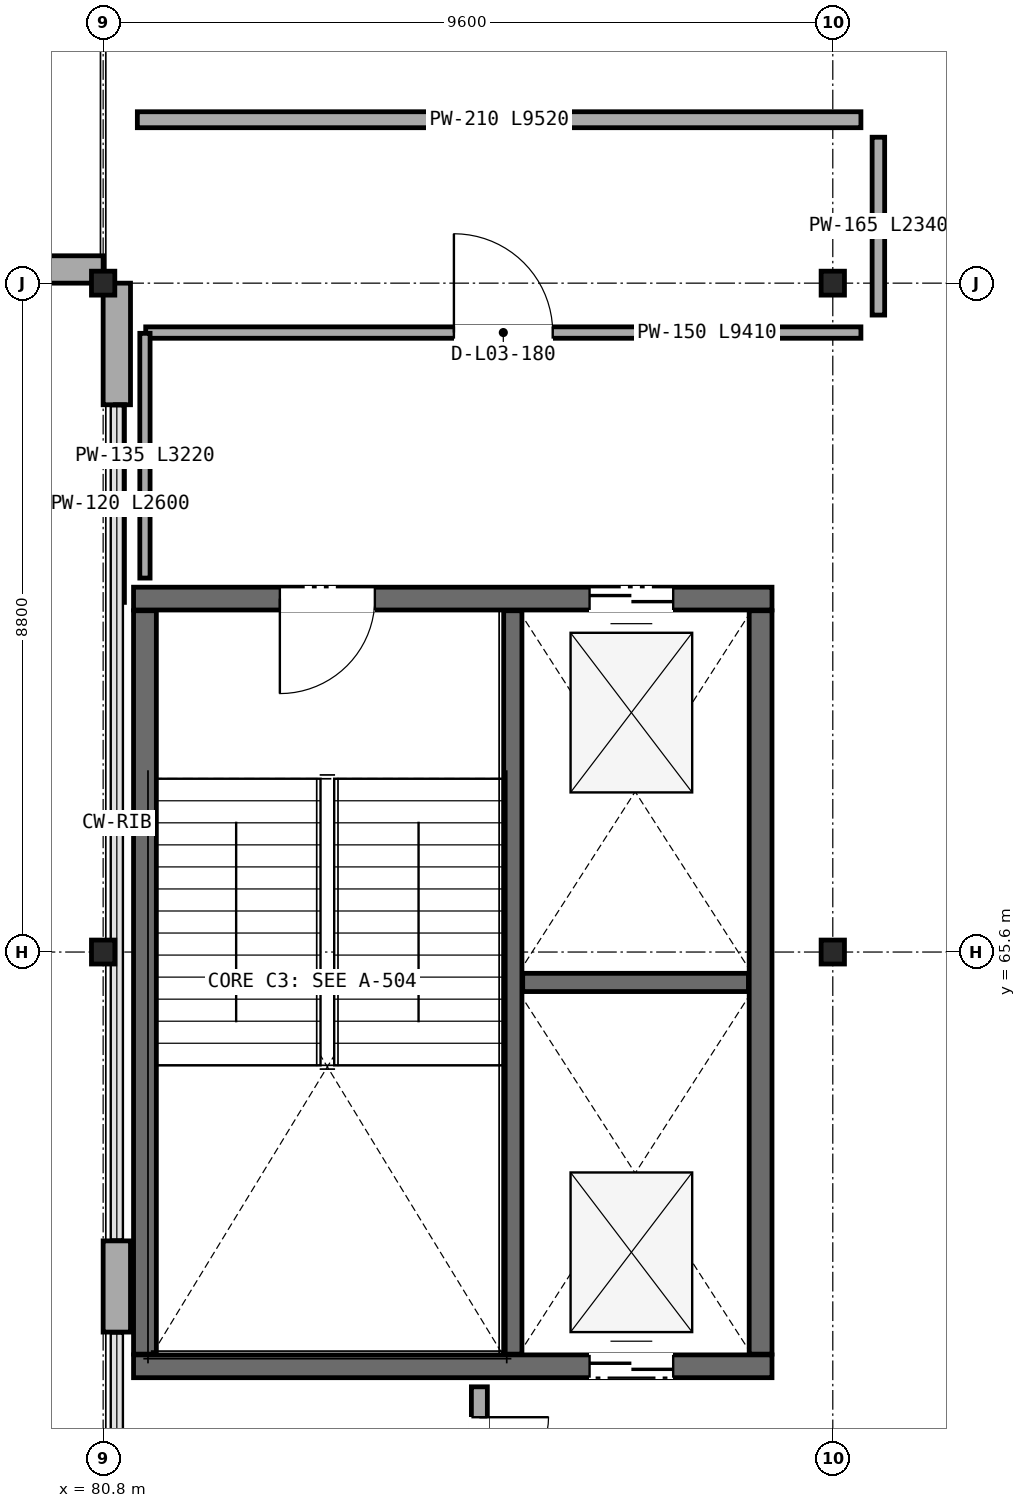
"""IFC4 building model, lengths in metres.
Left out: names, types, materials, properties, quantities, classifications, styles, units other than length and angle.
Written with IfcOpenShell. Run it as: python <this file> out.ifc"""

import sys

from ifc_helpers import new_model, si_unit, direction, frame, frame_2d, origin, origin_2d, place, context, subcontext, project, spatial, rectangle, i_section, extrude, element, fill, save


model = new_model("IFC4")
c1 = context("Model", 3, precision=1e-05, world=origin(), true_north=direction((0.0, 1.0)))
c2 = subcontext(c1, "Body", "Model", "MODEL_VIEW")
j1 = project(units=[si_unit("LENGTHUNIT", "METRE"), si_unit("PLANEANGLEUNIT", "RADIAN")], contexts=[c1])
p1 = place(None, origin())
s1 = spatial("IfcSite", under=j1, at=p1, CompositionType="ELEMENT")
p2 = place(p1, origin())
s2 = spatial("IfcBuilding", under=s1, at=p2, CompositionType="ELEMENT")
p3 = place(p2, frame((0.0, 0.0, 14.6)))
s3 = spatial("IfcBuildingStorey", under=s2, at=p3, CompositionType="ELEMENT", Elevation=14.6)
for number, where, z_axis, x_axis in (
    (1, (90.4, 65.6, 0.0), (0.0, 0.0, 1.0), (1.0, 0.0, 0.0)),
    (2, (90.4, 74.4, 0.0), (0.0, 0.0, 1.0), (1.0, 0.0, 0.0)),
    (3, (80.8, 65.6, 0.0), (0.0, 0.0, 1.0), (1.0, 0.0, 0.0)),
    (4, (80.8, 74.4, 0.0), (0.0, 0.0, 1.0), (1.0, 0.0, 0.0)),
):
    element("IfcColumn", number, at=place(p3, frame(where, z_axis=z_axis, x_axis=x_axis)), inside=s3, PredefinedType="COLUMN", context=c2, shape_type="SweptSolid", body=[
        extrude(i_section(OverallWidth=0.307, OverallDepth=0.315, WebThickness=0.012, FlangeThickness=0.019, FilletRadius=0.017, at=origin_2d()), origin(), (0.0, 0.0, 1.0), 4.5),
    ])
p4 = place(p3, frame((42.4, 74.58, 0.0), z_axis=(0.0, 0.0, 1.0), x_axis=(1.0, 0.0, 0.0)))
e5 = element("IfcWall", 5, at=p4, inside=s3, PredefinedType="SOLIDWALL", context=c2, shape_type="SweptSolid", body=[
    extrude(rectangle(XDim=38.4, YDim=0.36, at=frame_2d((19.2, 0.0))), origin(), (0.0, 0.0, 1.0), 3.662),
])
p5 = place(p4, frame((1.8, 0.0, 0.9)))
e6 = element("IfcOpeningElement", 6, at=p5, cuts=e5, PredefinedType="OPENING", context=c2, shape_type="SweptSolid", body=[
    extrude(rectangle(XDim=1.25, YDim=1.55, at=frame_2d((0.625, 0.775))), frame((0.0, 0.19, 0.0), z_axis=(0.0, -1.0, 0.0), x_axis=(1.0, 0.0, 0.0)), (0.0, 0.0, 1.0), 0.38),
])
p6 = place(p4, frame((6.4, 0.0, 0.9)))
e7 = element("IfcOpeningElement", 7, at=p6, cuts=e5, PredefinedType="OPENING", context=c2, shape_type="SweptSolid", body=[
    extrude(rectangle(XDim=1.52, YDim=1.55, at=frame_2d((0.76, 0.775))), frame((0.0, 0.19, 0.0), z_axis=(0.0, -1.0, 0.0), x_axis=(1.0, 0.0, 0.0)), (0.0, 0.0, 1.0), 0.38),
])
p7 = place(p4, frame((11.0, 0.0, 0.9)))
e8 = element("IfcOpeningElement", 8, at=p7, cuts=e5, PredefinedType="OPENING", context=c2, shape_type="SweptSolid", body=[
    extrude(rectangle(XDim=1.55, YDim=1.55, at=frame_2d((0.775, 0.775))), frame((0.0, 0.19, 0.0), z_axis=(0.0, -1.0, 0.0), x_axis=(1.0, 0.0, 0.0)), (0.0, 0.0, 1.0), 0.38),
])
p8 = place(p4, frame((15.6, 0.0, 0.9)))
e9 = element("IfcOpeningElement", 9, at=p8, cuts=e5, PredefinedType="OPENING", context=c2, shape_type="SweptSolid", body=[
    extrude(rectangle(XDim=1.82, YDim=1.55, at=frame_2d((0.91, 0.775))), frame((0.0, 0.19, 0.0), z_axis=(0.0, -1.0, 0.0), x_axis=(1.0, 0.0, 0.0)), (0.0, 0.0, 1.0), 0.38),
])
p9 = place(p4, frame((20.2, 0.0, 0.9)))
e10 = element("IfcOpeningElement", 10, at=p9, cuts=e5, PredefinedType="OPENING", context=c2, shape_type="SweptSolid", body=[
    extrude(rectangle(XDim=1.85, YDim=1.55, at=frame_2d((0.925, 0.775))), frame((0.0, 0.19, 0.0), z_axis=(0.0, -1.0, 0.0), x_axis=(1.0, 0.0, 0.0)), (0.0, 0.0, 1.0), 0.38),
])
p10 = place(p4, frame((24.8, 0.0, 0.9)))
e11 = element("IfcOpeningElement", 11, at=p10, cuts=e5, PredefinedType="OPENING", context=c2, shape_type="SweptSolid", body=[
    extrude(rectangle(XDim=2.0, YDim=1.55, at=frame_2d((1.0, 0.775))), frame((0.0, 0.19, 0.0), z_axis=(0.0, -1.0, 0.0), x_axis=(1.0, 0.0, 0.0)), (0.0, 0.0, 1.0), 0.38),
])
p11 = place(p3, frame((80.98, 74.4, 0.0), z_axis=(0.0, 0.0, 1.0), x_axis=(0.0, -1.0, 0.0)))
e12 = element("IfcWall", 12, at=p11, inside=s3, PredefinedType="SOLIDWALL", context=c2, shape_type="SweptSolid", body=[
    extrude(rectangle(XDim=1.6, YDim=0.36, at=frame_2d((0.8, 0.0))), origin(), (0.0, 0.0, 1.0), 3.702),
])
p12 = place(p3, frame((80.98, 61.8, 0.0), z_axis=(0.0, 0.0, 1.0), x_axis=(0.0, -1.0, 0.0)))
e13 = element("IfcWall", 13, at=p12, inside=s3, PredefinedType="SOLIDWALL", context=c2, shape_type="SweptSolid", body=[
    extrude(rectangle(XDim=1.2, YDim=0.36, at=frame_2d((0.6, 0.0))), origin(), (0.0, 0.0, 1.0), 3.778),
])
p13 = place(p3, frame((81.2, 60.15, 0.0), z_axis=(0.0, 0.0, 1.0), x_axis=(1.0, 0.0, 0.0)))
e14 = element("IfcWall", 14, at=p13, inside=s3, PredefinedType="SHEAR", context=c2, shape_type="SweptSolid", body=[
    extrude(rectangle(XDim=8.4, YDim=0.3, at=frame_2d((4.2, 0.0))), origin(), (0.0, 0.0, 1.0), 4.245),
])
p14 = place(p13, frame((6.0, 0.0, 0.0)))
e15 = element("IfcOpeningElement", 15, at=p14, cuts=e14, PredefinedType="OPENING", context=c2, shape_type="SweptSolid", body=[
    extrude(rectangle(XDim=1.1, YDim=2.2, at=frame_2d((0.55, 1.1))), frame((0.0, 0.16, 0.0), z_axis=(0.0, -1.0, 0.0), x_axis=(1.0, 0.0, 0.0)), (0.0, 0.0, 1.0), 0.32),
])
p15 = place(p3, frame((89.6, 70.25, 0.0), z_axis=(0.0, 0.0, 1.0), x_axis=(-1.0, 0.0, 0.0)))
e16 = element("IfcWall", 16, at=p15, inside=s3, PredefinedType="SHEAR", context=c2, shape_type="SweptSolid", body=[
    extrude(rectangle(XDim=8.4, YDim=0.3, at=frame_2d((4.2, 0.0))), origin(), (0.0, 0.0, 1.0), 4.245),
])
p16 = place(p15, frame((5.225, 0.0, 0.0)))
e17 = element("IfcOpeningElement", 17, at=p16, cuts=e16, PredefinedType="OPENING", context=c2, shape_type="SweptSolid", body=[
    extrude(rectangle(XDim=1.25, YDim=2.2, at=frame_2d((0.625, 1.1))), frame((0.0, 0.16, 0.0), z_axis=(0.0, -1.0, 0.0), x_axis=(1.0, 0.0, 0.0)), (0.0, 0.0, 1.0), 0.32),
])
p17 = place(p15, frame((1.3, 0.0, 0.0)))
e18 = element("IfcOpeningElement", 18, at=p17, cuts=e16, PredefinedType="OPENING", context=c2, shape_type="SweptSolid", body=[
    extrude(rectangle(XDim=1.1, YDim=2.2, at=frame_2d((0.55, 1.1))), frame((0.0, 0.16, 0.0), z_axis=(0.0, -1.0, 0.0), x_axis=(1.0, 0.0, 0.0)), (0.0, 0.0, 1.0), 0.32),
])
for number, where, z_axis, x_axis in (
    (19, (89.45, 60.31, 0.0), (0.0, 0.0, 1.0), (0.0, 1.0, 0.0)),
    (20, (81.35, 70.09, 0.0), (0.0, 0.0, 1.0), (0.0, -1.0, 0.0)),
):
    element("IfcWall", number, at=place(p3, frame(where, z_axis=z_axis, x_axis=x_axis)), inside=s3, PredefinedType="SHEAR", context=c2, shape_type="SweptSolid", body=[
        extrude(rectangle(XDim=9.78, YDim=0.3, at=frame_2d((4.89, 0.0))), origin(), (0.0, 0.0, 1.0), 4.245),
    ])
p18 = place(p3, frame((86.19, 60.31, 0.0), z_axis=(0.0, 0.0, 1.0), x_axis=(0.0, 1.0, 0.0)))
e21 = element("IfcWall", 21, at=p18, inside=s3, PredefinedType="SOLIDWALL", context=c2, shape_type="SweptSolid", body=[
    extrude(rectangle(XDim=9.78, YDim=0.24, at=frame_2d((4.89, 0.0))), origin(), (0.0, 0.0, 1.0), 4.245),
])
p19 = place(p3, frame((86.32, 65.2, 0.0), z_axis=(0.0, 0.0, 1.0), x_axis=(1.0, 0.0, 0.0)))
e22 = element("IfcWall", 22, at=p19, inside=s3, PredefinedType="SOLIDWALL", context=c2, shape_type="SweptSolid", body=[
    extrude(rectangle(XDim=2.97, YDim=0.24, at=frame_2d((1.485, 0.0))), origin(), (0.0, 0.0, 1.0), 4.245),
])
p20 = place(p3, frame((85.75, 59.88, 0.0), z_axis=(0.0, 0.0, 1.0), x_axis=(0.0, -1.0, 0.0)))
e23 = element("IfcWall", 23, at=p20, inside=s3, PredefinedType="PARTITIONING", context=c2, shape_type="SweptSolid", body=[
    extrude(rectangle(XDim=2.62, YDim=0.21, at=frame_2d((1.31, 0.0))), origin(), (0.0, 0.0, 1.0), 4.13),
])
p21 = place(p20, frame((0.4, 0.0, 0.0)))
e24 = element("IfcOpeningElement", 24, at=p21, cuts=e23, PredefinedType="OPENING", context=c2, shape_type="SweptSolid", body=[
    extrude(rectangle(XDim=1.82, YDim=2.34, at=frame_2d((0.91, 1.17))), frame((0.0, 0.115, 0.0), z_axis=(0.0, -1.0, 0.0), x_axis=(1.0, 0.0, 0.0)), (0.0, 0.0, 1.0), 0.23),
])
p22 = place(p3, frame((91.0, 76.32, 0.0), z_axis=(0.0, 0.0, 1.0), x_axis=(0.0, -1.0, 0.0)))
e25 = element("IfcWall", 25, at=p22, inside=s3, PredefinedType="PARTITIONING", context=c2, shape_type="SweptSolid", body=[
    extrude(rectangle(XDim=2.34, YDim=0.165, at=frame_2d((1.17, 0.0))), origin(), (0.0, 0.0, 1.0), 4.13),
])
p23 = place(p3, frame((90.77, 73.75, 0.0), z_axis=(0.0, 0.0, 1.0), x_axis=(-1.0, 0.0, 0.0)))
e26 = element("IfcWall", 26, at=p23, inside=s3, PredefinedType="PARTITIONING", context=c2, shape_type="SweptSolid", body=[
    extrude(rectangle(XDim=9.41, YDim=0.15, at=frame_2d((4.705, 0.0))), origin(), (0.0, 0.0, 1.0), 3.763),
])
p24 = place(p23, frame((4.055, 0.0, 0.0)))
e27 = element("IfcOpeningElement", 27, at=p24, cuts=e26, PredefinedType="OPENING", context=c2, shape_type="SweptSolid", body=[
    extrude(rectangle(XDim=1.3, YDim=2.46, at=frame_2d((0.65, 1.23))), frame((0.0, 0.085, 0.0), z_axis=(0.0, -1.0, 0.0), x_axis=(1.0, 0.0, 0.0)), (0.0, 0.0, 1.0), 0.17),
])
p25 = place(p3, frame((81.35, 73.74, 0.0), z_axis=(0.0, 0.0, 1.0), x_axis=(0.0, -1.0, 0.0)))
e28 = element("IfcWall", 28, at=p25, inside=s3, PredefinedType="PARTITIONING", context=c2, shape_type="SweptSolid", body=[
    extrude(rectangle(XDim=3.22, YDim=0.135, at=frame_2d((1.61, 0.0))), origin(), (0.0, 0.0, 1.0), 4.13),
])
p26 = place(p3, frame((81.02, 70.2, 0.0), z_axis=(0.0, 0.0, 1.0), x_axis=(0.0, 1.0, 0.0)))
e29 = element("IfcWall", 29, at=p26, inside=s3, PredefinedType="PARTITIONING", context=c2, shape_type="SweptSolid", body=[
    extrude(rectangle(XDim=2.6, YDim=0.12, at=frame_2d((1.3, 0.0))), origin(), (0.0, 0.0, 1.0), 2.9),
])
p27 = place(p3, frame((81.25, 76.55, 0.0), z_axis=(0.0, 0.0, 1.0), x_axis=(1.0, 0.0, 0.0)))
e30 = element("IfcWall", 30, at=p27, inside=s3, PredefinedType="PARTITIONING", context=c2, shape_type="SweptSolid", body=[
    extrude(rectangle(XDim=9.52, YDim=0.21, at=frame_2d((4.76, 0.0))), origin(), (0.0, 0.0, 1.0), 3.763),
])
p28 = place(p16, origin())
e31 = element("IfcDoor", 31, at=p28, inside=s3, OperationType="SINGLE_SWING_RIGHT", PredefinedType="DOOR", context=c2, shape_type="SweptSolid", body=[
    extrude(rectangle(XDim=1.25, YDim=2.2, at=frame_2d((0.625, 1.1))), frame((0.0, 0.025, 0.0), z_axis=(0.0, -1.0, 0.0), x_axis=(1.0, 0.0, 0.0)), (0.0, 0.0, 1.0), 0.05),
])
fill(e17, e31)
p29 = place(p14, origin())
e32 = element("IfcDoor", 32, at=p29, inside=s3, OperationType="DOUBLE_DOOR_SLIDING", PredefinedType="DOOR", context=c2, shape_type="SweptSolid", body=[
    extrude(rectangle(XDim=1.1, YDim=2.2, at=frame_2d((0.55, 1.1))), frame((0.0, 0.025, 0.0), z_axis=(0.0, -1.0, 0.0), x_axis=(1.0, 0.0, 0.0)), (0.0, 0.0, 1.0), 0.05),
])
fill(e15, e32)
p30 = place(p17, origin())
e33 = element("IfcDoor", 33, at=p30, inside=s3, OperationType="DOUBLE_DOOR_SLIDING", PredefinedType="DOOR", context=c2, shape_type="SweptSolid", body=[
    extrude(rectangle(XDim=1.1, YDim=2.2, at=frame_2d((0.55, 1.1))), frame((0.0, 0.025, 0.0), z_axis=(0.0, -1.0, 0.0), x_axis=(1.0, 0.0, 0.0)), (0.0, 0.0, 1.0), 0.05),
])
fill(e18, e33)
p31 = place(p21, origin())
e34 = element("IfcDoor", 34, at=p31, inside=s3, OperationType="DOUBLE_DOOR_SINGLE_SWING", PredefinedType="DOOR", context=c2, shape_type="SweptSolid", body=[
    extrude(rectangle(XDim=1.82, YDim=2.34, at=frame_2d((0.91, 1.17))), frame((0.0, 0.025, 0.0), z_axis=(0.0, -1.0, 0.0), x_axis=(1.0, 0.0, 0.0)), (0.0, 0.0, 1.0), 0.05),
])
fill(e24, e34)
p32 = place(p24, frame((1.3, 0.0, 0.0), z_axis=(0.0, 0.0, 1.0), x_axis=(-1.0, 0.0, 0.0)))
e35 = element("IfcDoor", 35, at=p32, inside=s3, OperationType="SINGLE_SWING_RIGHT", PredefinedType="DOOR", context=c2, shape_type="SweptSolid", body=[
    extrude(rectangle(XDim=1.3, YDim=2.46, at=frame_2d((0.65, 1.23))), frame((0.0, 0.025, 0.0), z_axis=(0.0, -1.0, 0.0), x_axis=(1.0, 0.0, 0.0)), (0.0, 0.0, 1.0), 0.05),
])
fill(e27, e35)
save(model, sys.argv[1])
